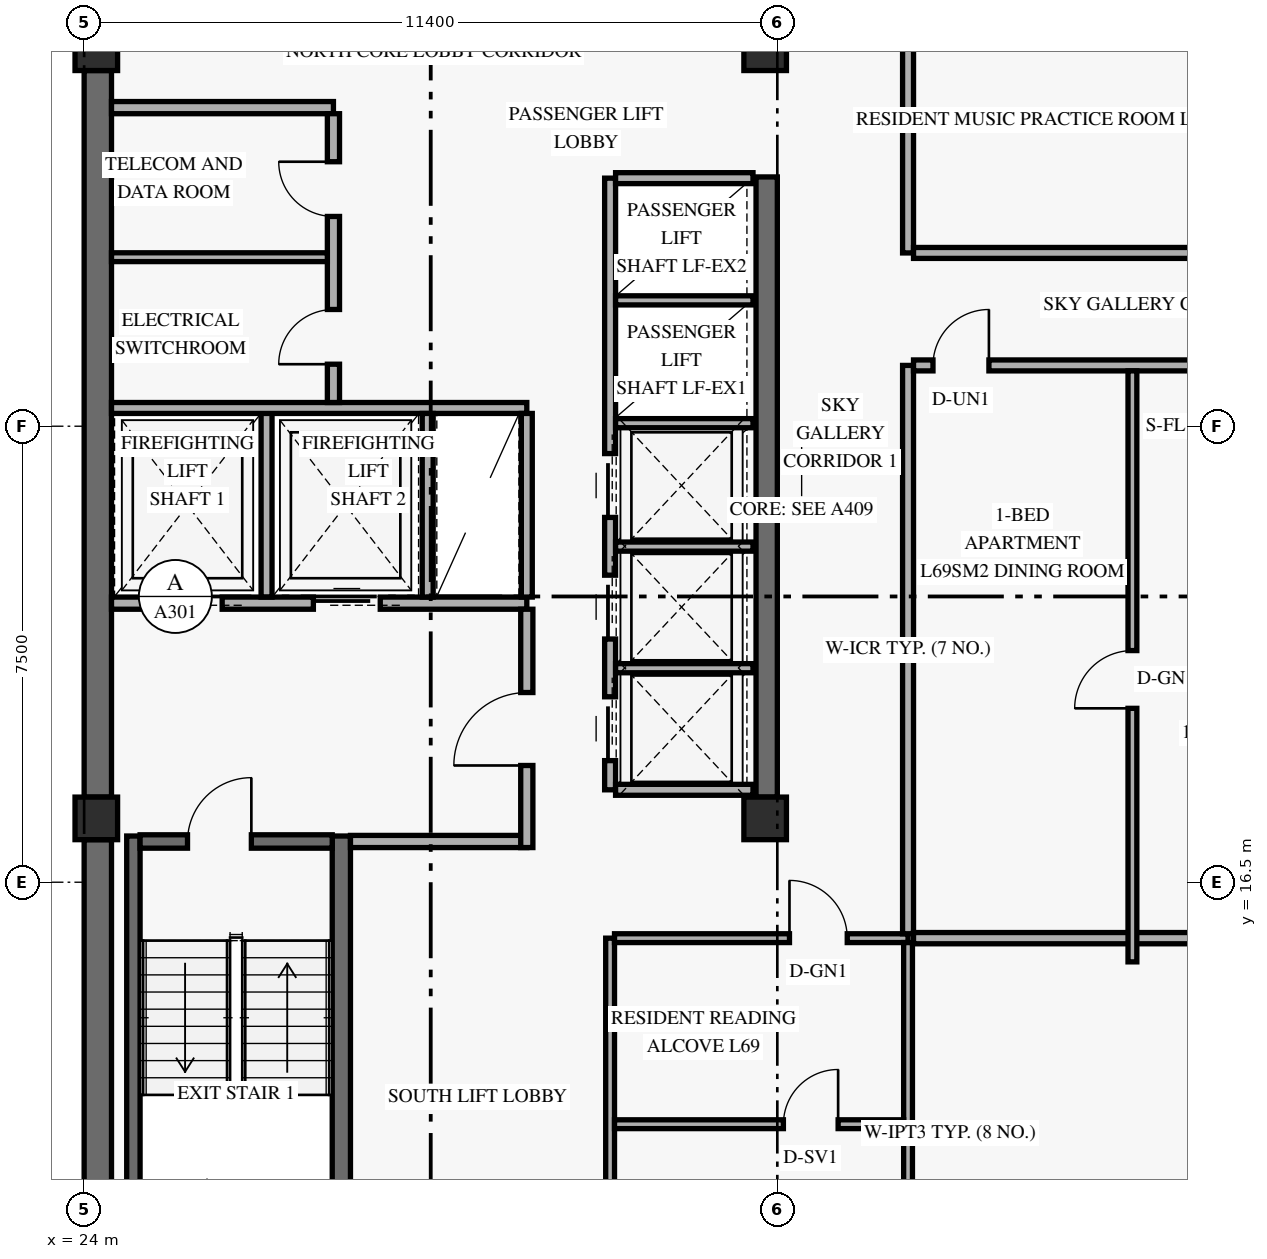
"""IFC4 building model, lengths in metres.
Left out: names, types, materials, properties, quantities, classifications, styles, units other than length and angle.
Written with IfcOpenShell. Run it as: python <this file> out.ifc"""

import sys

from ifc_helpers import new_model, si_unit, direction, frame, frame_2d, origin, origin_2d, place, context, subcontext, project, spatial, rectangle, extrude, element, fill, save


model = new_model("IFC4")
c1 = context("Model", 3, precision=1e-05, world=origin(), true_north=direction((0.0, 1.0)))
c2 = subcontext(c1, "Body", "Model", "MODEL_VIEW")
j1 = project(units=[si_unit("LENGTHUNIT", "METRE"), si_unit("PLANEANGLEUNIT", "RADIAN")], contexts=[c1])
p1 = place(None, origin())
s1 = spatial("IfcSite", under=j1, at=p1, CompositionType="ELEMENT")
p2 = place(p1, origin())
s2 = spatial("IfcBuilding", under=s1, at=p2, CompositionType="ELEMENT")
p3 = place(p2, frame((0.0, 0.0, 264.0)))
s3 = spatial("IfcBuildingStorey", under=s2, at=p3, CompositionType="ELEMENT", Elevation=264.0)
p4 = place(p3, frame((24.225, 9.6, 0.0), z_axis=(0.0, 0.0, 1.0), x_axis=(0.0, 1.0, 0.0)))
e1 = element("IfcWall", 1, at=p4, inside=s3, PredefinedType="SHEAR", context=c2, shape_type="SweptSolid", body=[
    extrude(rectangle(XDim=7.6, YDim=0.45, at=frame_2d((3.8, 0.0))), origin(), (0.0, 0.0, 1.0), 2.821),
])
p5 = place(p3, frame((24.225, 17.9, 0.0), z_axis=(0.0, 0.0, 1.0), x_axis=(0.0, 1.0, 0.0)))
e2 = element("IfcWall", 2, at=p5, inside=s3, PredefinedType="SHEAR", context=c2, shape_type="SweptSolid", body=[
    extrude(rectangle(XDim=11.95, YDim=0.45, at=frame_2d((5.975, 0.0))), origin(), (0.0, 0.0, 1.0), 2.821),
])
p6 = place(p3, frame((35.225, 17.9, 0.0), z_axis=(0.0, 0.0, 1.0), x_axis=(0.0, 1.0, 0.0)))
e3 = element("IfcWall", 3, at=p6, inside=s3, PredefinedType="SHEAR", context=c2, shape_type="SweptSolid", body=[
    extrude(rectangle(XDim=10.2, YDim=0.35, at=frame_2d((5.1, 0.0))), origin(), (0.0, 0.0, 1.0), 2.821),
])
p7 = place(p3, frame((24.81, 9.5, 0.0), z_axis=(0.0, 0.0, 1.0), x_axis=(0.0, 1.0, 0.0)))
e4 = element("IfcWall", 4, at=p7, inside=s3, PredefinedType="SHEAR", context=c2, shape_type="SweptSolid", body=[
    extrude(rectangle(XDim=7.76, YDim=0.22, at=frame_2d((3.88, 0.0))), origin(), (0.0, 0.0, 1.0), 3.36),
])
p8 = place(p3, frame((28.23, 9.5, 0.0), z_axis=(0.0, 0.0, 1.0), x_axis=(0.0, 1.0, 0.0)))
e5 = element("IfcWall", 5, at=p8, inside=s3, PredefinedType="SHEAR", context=c2, shape_type="SweptSolid", body=[
    extrude(rectangle(XDim=7.76, YDim=0.3, at=frame_2d((3.88, 0.0))), origin(), (0.0, 0.0, 1.0), 3.36),
])
p9 = place(p3, frame((24.92, 17.17, 0.0), z_axis=(0.0, 0.0, 1.0), x_axis=(1.0, 0.0, 0.0)))
e6 = element("IfcWall", 6, at=p9, inside=s3, PredefinedType="SHEAR", context=c2, shape_type="SweptSolid", body=[
    extrude(rectangle(XDim=3.16, YDim=0.22, at=frame_2d((1.58, 0.0))), origin(), (0.0, 0.0, 1.0), 3.36),
])
p10 = place(p9, frame((0.78, 0.0, 0.0)))
e7 = element("IfcOpeningElement", 7, at=p10, cuts=e6, PredefinedType="OPENING", context=c2, shape_type="SweptSolid", body=[
    extrude(rectangle(XDim=1.05, YDim=2.15, at=frame_2d((0.525, 1.075))), frame((0.0, 0.12, 0.0), z_axis=(0.0, -1.0, 0.0), x_axis=(1.0, 0.0, 0.0)), (0.0, 0.0, 1.0), 0.24),
])
for number, where, z_axis, x_axis in (
    (8, (24.2, 17.55, 0.0), (0.0, 0.0, 1.0), (1.0, 0.0, 0.0)),
    (9, (24.2, 30.2, 0.0), (0.0, 0.0, 1.0), (1.0, 0.0, 0.0)),
    (10, (35.2, 17.55, 0.0), (0.0, 0.0, 1.0), (1.0, 0.0, 0.0)),
    (11, (35.2, 30.2, 0.0), (0.0, 0.0, 1.0), (1.0, 0.0, 0.0)),
):
    element("IfcColumn", number, at=place(p3, frame(where, z_axis=z_axis, x_axis=x_axis)), inside=s3, PredefinedType="COLUMN", context=c2, shape_type="SweptSolid", body=[
        extrude(rectangle(XDim=0.7, YDim=0.7, at=origin_2d()), origin(), (0.0, 0.0, 1.0), 3.6),
    ])
p11 = place(p3, frame((24.45, 21.09, 0.0), z_axis=(0.0, 0.0, 1.0), x_axis=(1.0, 0.0, 0.0)))
e12 = element("IfcWall", 12, at=p11, inside=s3, PredefinedType="STANDARD", context=c2, shape_type="SweptSolid", body=[
    extrude(rectangle(XDim=6.83, YDim=0.2, at=frame_2d((3.415, 0.0))), origin(), (0.0, 0.0, 1.0), 3.36),
])
p12 = place(p11, frame((0.72, 0.0, 0.0)))
e13 = element("IfcOpeningElement", 13, at=p12, cuts=e12, PredefinedType="OPENING", context=c2, shape_type="SweptSolid", body=[
    extrude(rectangle(XDim=1.1, YDim=2.2, at=frame_2d((0.55, 1.1))), frame((0.0, 0.11, 0.0), z_axis=(0.0, -1.0, 0.0), x_axis=(1.0, 0.0, 0.0)), (0.0, 0.0, 1.0), 0.22),
])
p13 = place(p11, frame((3.32, 0.0, 0.0)))
e14 = element("IfcOpeningElement", 14, at=p13, cuts=e12, PredefinedType="OPENING", context=c2, shape_type="SweptSolid", body=[
    extrude(rectangle(XDim=1.1, YDim=2.2, at=frame_2d((0.55, 1.1))), frame((0.0, 0.11, 0.0), z_axis=(0.0, -1.0, 0.0), x_axis=(1.0, 0.0, 0.0)), (0.0, 0.0, 1.0), 0.22),
])
p14 = place(p3, frame((28.38, 17.17, 0.0), z_axis=(0.0, 0.0, 1.0), x_axis=(1.0, 0.0, 0.0)))
e15 = element("IfcWall", 15, at=p14, inside=s3, PredefinedType="STANDARD", context=c2, shape_type="SweptSolid", body=[
    extrude(rectangle(XDim=2.9, YDim=0.2, at=frame_2d((1.45, 0.0))), origin(), (0.0, 0.0, 1.0), 3.36),
])
p15 = place(p3, frame((31.28, 17.07, 0.0), z_axis=(0.0, 0.0, 1.0), x_axis=(0.0, 1.0, 0.0)))
e16 = element("IfcWall", 16, at=p15, inside=s3, PredefinedType="STANDARD", context=c2, shape_type="SweptSolid", body=[
    extrude(rectangle(XDim=3.92, YDim=0.2, at=frame_2d((1.96, 0.0))), origin(), (0.0, 0.0, 1.0), 2.803),
])
p16 = place(p15, frame((1.35, 0.0, 0.0)))
e17 = element("IfcOpeningElement", 17, at=p16, cuts=e16, PredefinedType="OPENING", context=c2, shape_type="SweptSolid", body=[
    extrude(rectangle(XDim=1.2, YDim=2.15, at=frame_2d((0.6, 1.075))), frame((0.0, 0.11, 0.0), z_axis=(0.0, -1.0, 0.0), x_axis=(1.0, 0.0, 0.0)), (0.0, 0.0, 1.0), 0.22),
])
p17 = place(p3, frame((27.0, 21.19, 0.0), z_axis=(0.0, 0.0, 1.0), x_axis=(0.0, 1.0, 0.0)))
e18 = element("IfcWall", 18, at=p17, inside=s3, PredefinedType="STANDARD", context=c2, shape_type="SweptSolid", body=[
    extrude(rectangle(XDim=3.11, YDim=0.18, at=frame_2d((1.555, 0.0))), origin(), (0.0, 0.0, 1.0), 3.36),
])
p18 = place(p3, frame((24.45, 24.3, 0.0), z_axis=(0.0, 0.0, 1.0), x_axis=(1.0, 0.0, 0.0)))
e19 = element("IfcWall", 19, at=p18, inside=s3, PredefinedType="STANDARD", context=c2, shape_type="SweptSolid", body=[
    extrude(rectangle(XDim=6.83, YDim=0.18, at=frame_2d((3.415, 0.0))), origin(), (0.0, 0.0, 1.0), 3.36),
])
for number, where, z_axis, x_axis in (
    (20, (29.65, 21.19, 0.0), (0.0, 0.0, 1.0), (0.0, 1.0, 0.0)),
    (21, (31.28, 21.19, 0.0), (0.0, 0.0, 1.0), (0.0, 1.0, 0.0)),
):
    element("IfcWall", number, at=place(p3, frame(where, z_axis=z_axis, x_axis=x_axis)), inside=s3, PredefinedType="STANDARD", context=c2, shape_type="SweptSolid", body=[
        extrude(rectangle(XDim=3.02, YDim=0.18, at=frame_2d((1.51, 0.0))), origin(), (0.0, 0.0, 1.0), 3.36),
    ])
p19 = place(p3, frame((24.45, 29.24, 0.0), z_axis=(0.0, 0.0, 1.0), x_axis=(1.0, 0.0, 0.0)))
e22 = element("IfcWall", 22, at=p19, inside=s3, PredefinedType="STANDARD", context=c2, shape_type="SweptSolid", body=[
    extrude(rectangle(XDim=3.65, YDim=0.2, at=frame_2d((1.825, 0.0))), origin(), (0.0, 0.0, 1.0), 3.36),
])
p20 = place(p3, frame((28.1, 24.39, 0.0), z_axis=(0.0, 0.0, 1.0), x_axis=(0.0, 1.0, 0.0)))
e23 = element("IfcWall", 23, at=p20, inside=s3, PredefinedType="STANDARD", context=c2, shape_type="SweptSolid", body=[
    extrude(rectangle(XDim=4.75, YDim=0.2, at=frame_2d((2.375, 0.0))), origin(), (0.0, 0.0, 1.0), 3.36),
])
p21 = place(p20, frame((0.63, 0.0, 0.0)))
e24 = element("IfcOpeningElement", 24, at=p21, cuts=e23, PredefinedType="OPENING", context=c2, shape_type="SweptSolid", body=[
    extrude(rectangle(XDim=0.9, YDim=2.1, at=frame_2d((0.45, 1.05))), frame((0.0, 0.11, 0.0), z_axis=(0.0, -1.0, 0.0), x_axis=(1.0, 0.0, 0.0)), (0.0, 0.0, 1.0), 0.22),
])
p22 = place(p20, frame((3.06, 0.0, 0.0)))
e25 = element("IfcOpeningElement", 25, at=p22, cuts=e23, PredefinedType="OPENING", context=c2, shape_type="SweptSolid", body=[
    extrude(rectangle(XDim=0.9, YDim=2.1, at=frame_2d((0.45, 1.05))), frame((0.0, 0.11, 0.0), z_axis=(0.0, -1.0, 0.0), x_axis=(1.0, 0.0, 0.0)), (0.0, 0.0, 1.0), 0.22),
])
p23 = place(p3, frame((24.45, 26.78, 0.0), z_axis=(0.0, 0.0, 1.0), x_axis=(1.0, 0.0, 0.0)))
e26 = element("IfcWall", 26, at=p23, inside=s3, PredefinedType="PARTITIONING", context=c2, shape_type="SweptSolid", body=[
    extrude(rectangle(XDim=3.55, YDim=0.145, at=frame_2d((1.775, 0.0))), origin(), (0.0, 0.0, 1.0), 3.36),
])
p24 = place(p3, frame((32.65, 18.02, 0.0), z_axis=(0.0, 0.0, 1.0), x_axis=(0.0, 1.0, 0.0)))
e27 = element("IfcWall", 27, at=p24, inside=s3, PredefinedType="STANDARD", context=c2, shape_type="SweptSolid", body=[
    extrude(rectangle(XDim=10.06, YDim=0.18, at=frame_2d((5.03, 0.0))), origin(), (0.0, 0.0, 1.0), 3.36),
])
p25 = place(p24, frame((0.48, 0.0, 0.0)))
e28 = element("IfcOpeningElement", 28, at=p25, cuts=e27, PredefinedType="OPENING", context=c2, shape_type="SweptSolid", body=[
    extrude(rectangle(XDim=1.05, YDim=2.2, at=frame_2d((0.525, 1.1))), frame((0.0, 0.1, 0.0), z_axis=(0.0, -1.0, 0.0), x_axis=(1.0, 0.0, 0.0)), (0.0, 0.0, 1.0), 0.2),
])
p26 = place(p24, frame((2.48, 0.0, 0.0)))
e29 = element("IfcOpeningElement", 29, at=p26, cuts=e27, PredefinedType="OPENING", context=c2, shape_type="SweptSolid", body=[
    extrude(rectangle(XDim=1.05, YDim=2.2, at=frame_2d((0.525, 1.1))), frame((0.0, 0.1, 0.0), z_axis=(0.0, -1.0, 0.0), x_axis=(1.0, 0.0, 0.0)), (0.0, 0.0, 1.0), 0.2),
])
p27 = place(p24, frame((4.48, 0.0, 0.0)))
e30 = element("IfcOpeningElement", 30, at=p27, cuts=e27, PredefinedType="OPENING", context=c2, shape_type="SweptSolid", body=[
    extrude(rectangle(XDim=1.05, YDim=2.2, at=frame_2d((0.525, 1.1))), frame((0.0, 0.1, 0.0), z_axis=(0.0, -1.0, 0.0), x_axis=(1.0, 0.0, 0.0)), (0.0, 0.0, 1.0), 0.2),
])
for number, where, z_axis, x_axis in (
    (31, (32.74, 18.02, 0.0), (0.0, 0.0, 1.0), (1.0, 0.0, 0.0)),
    (32, (32.74, 28.08, 0.0), (0.0, 0.0, 1.0), (1.0, 0.0, 0.0)),
):
    element("IfcWall", number, at=place(p3, frame(where, z_axis=z_axis, x_axis=x_axis)), inside=s3, PredefinedType="STANDARD", context=c2, shape_type="SweptSolid", body=[
        extrude(rectangle(XDim=2.26, YDim=0.18, at=frame_2d((1.13, 0.0))), origin(), (0.0, 0.0, 1.0), 3.36),
    ])
for number, where, z_axis, x_axis in (
    (33, (32.74, 20.02, 0.0), (0.0, 0.0, 1.0), (1.0, 0.0, 0.0)),
    (34, (32.74, 22.02, 0.0), (0.0, 0.0, 1.0), (1.0, 0.0, 0.0)),
    (35, (32.74, 24.05, 0.0), (0.0, 0.0, 1.0), (1.0, 0.0, 0.0)),
    (36, (32.74, 26.07, 0.0), (0.0, 0.0, 1.0), (1.0, 0.0, 0.0)),
):
    element("IfcWall", number, at=place(p3, frame(where, z_axis=z_axis, x_axis=x_axis)), inside=s3, PredefinedType="STANDARD", context=c2, shape_type="SweptSolid", body=[
        extrude(rectangle(XDim=2.26, YDim=0.15, at=frame_2d((1.13, 0.0))), origin(), (0.0, 0.0, 1.0), 3.36),
    ])
p28 = place(p3, frame((32.65, 9.5, 0.0), z_axis=(0.0, 0.0, 1.0), x_axis=(0.0, 1.0, 0.0)))
e37 = element("IfcWall", 37, at=p28, inside=s3, PredefinedType="PARTITIONING", context=c2, shape_type="SweptSolid", body=[
    extrude(rectangle(XDim=6.08, YDim=0.145, at=frame_2d((3.04, 0.0))), origin(), (0.0, 0.0, 1.0), 3.36),
])
p29 = place(p3, frame((32.722, 15.58, 0.0), z_axis=(0.0, 0.0, 1.0), x_axis=(1.0, 0.0, 0.0)))
e38 = element("IfcWall", 38, at=p29, inside=s3, PredefinedType="PARTITIONING", context=c2, shape_type="SweptSolid", body=[
    extrude(rectangle(XDim=4.828, YDim=0.145, at=frame_2d((2.414, 0.0))), origin(), (0.0, 0.0, 1.0), 2.803),
])
p30 = place(p29, frame((2.877, 0.0, 0.0)))
e39 = element("IfcOpeningElement", 39, at=p30, cuts=e38, PredefinedType="OPENING", context=c2, shape_type="SweptSolid", body=[
    extrude(rectangle(XDim=0.95, YDim=2.15, at=frame_2d((0.475, 1.075))), frame((0.0, 0.083, 0.0), z_axis=(0.0, -1.0, 0.0), x_axis=(1.0, 0.0, 0.0)), (0.0, 0.0, 1.0), 0.165),
])
p31 = place(p3, frame((37.55, 9.25, 0.0), z_axis=(0.0, 0.0, 1.0), x_axis=(0.0, 1.0, 0.0)))
e40 = element("IfcWall", 40, at=p31, inside=s3, PredefinedType="PARTITIONING", context=c2, shape_type="SweptSolid", body=[
    extrude(rectangle(XDim=6.258, YDim=0.145, at=frame_2d((3.129, 0.0))), origin(), (0.0, 0.0, 1.0), 2.803),
])
p32 = place(p3, frame((32.722, 12.52, 0.0), z_axis=(0.0, 0.0, 1.0), x_axis=(1.0, 0.0, 0.0)))
e41 = element("IfcWall", 41, at=p32, inside=s3, PredefinedType="PARTITIONING", context=c2, shape_type="SweptSolid", body=[
    extrude(rectangle(XDim=4.755, YDim=0.145, at=frame_2d((2.377, 0.0))), origin(), (0.0, 0.0, 1.0), 2.803),
])
p33 = place(p32, frame((2.778, 0.0, 0.0)))
e42 = element("IfcOpeningElement", 42, at=p33, cuts=e41, PredefinedType="OPENING", context=c2, shape_type="SweptSolid", body=[
    extrude(rectangle(XDim=0.9, YDim=2.1, at=frame_2d((0.45, 1.05))), frame((0.0, 0.083, 0.0), z_axis=(0.0, -1.0, 0.0), x_axis=(1.0, 0.0, 0.0)), (0.0, 0.0, 1.0), 0.165),
])
p34 = place(p3, frame((37.55, 15.653, 0.0), z_axis=(0.0, 0.0, 1.0), x_axis=(0.0, 1.0, 0.0)))
e43 = element("IfcWall", 43, at=p34, inside=s3, PredefinedType="STANDARD", context=c2, shape_type="SweptSolid", body=[
    extrude(rectangle(XDim=9.347, YDim=0.18, at=frame_2d((4.674, 0.0))), origin(), (0.0, 0.0, 1.0), 2.803),
])
p35 = place(p3, frame((37.55, 26.85, 0.0), z_axis=(0.0, 0.0, 1.0), x_axis=(0.0, 1.0, 0.0)))
e44 = element("IfcWall", 44, at=p35, inside=s3, PredefinedType="STANDARD", context=c2, shape_type="SweptSolid", body=[
    extrude(rectangle(XDim=4.427, YDim=0.18, at=frame_2d((2.214, 0.0))), origin(), (0.0, 0.0, 1.0), 2.803),
])
p36 = place(p3, frame((37.64, 25.0, 0.0), z_axis=(0.0, 0.0, 1.0), x_axis=(1.0, 0.0, 0.0)))
e45 = element("IfcWall", 45, at=p36, inside=s3, PredefinedType="STANDARD", context=c2, shape_type="SweptSolid", body=[
    extrude(rectangle(XDim=16.87, YDim=0.18, at=frame_2d((8.435, 0.0))), origin(), (0.0, 0.0, 1.0), 2.803),
])
p37 = place(p36, frame((0.32, 0.0, 0.0)))
e46 = element("IfcOpeningElement", 46, at=p37, cuts=e45, PredefinedType="OPENING", context=c2, shape_type="SweptSolid", body=[
    extrude(rectangle(XDim=0.92, YDim=2.15, at=frame_2d((0.46, 1.075))), frame((0.0, 0.1, 0.0), z_axis=(0.0, -1.0, 0.0), x_axis=(1.0, 0.0, 0.0)), (0.0, 0.0, 1.0), 0.2),
])
p38 = place(p3, frame((37.64, 26.85, 0.0), z_axis=(0.0, 0.0, 1.0), x_axis=(1.0, 0.0, 0.0)))
e47 = element("IfcWall", 47, at=p38, inside=s3, PredefinedType="STANDARD", context=c2, shape_type="SweptSolid", body=[
    extrude(rectangle(XDim=16.87, YDim=0.18, at=frame_2d((8.435, 0.0))), origin(), (0.0, 0.0, 1.0), 2.803),
])
p39 = place(p38, frame((7.975, 0.0, 0.0)))
e48 = element("IfcOpeningElement", 48, at=p39, cuts=e47, PredefinedType="OPENING", context=c2, shape_type="SweptSolid", body=[
    extrude(rectangle(XDim=0.92, YDim=2.15, at=frame_2d((0.46, 1.075))), frame((0.0, 0.1, 0.0), z_axis=(0.0, -1.0, 0.0), x_axis=(1.0, 0.0, 0.0)), (0.0, 0.0, 1.0), 0.2),
])
p40 = place(p3, frame((37.64, 15.58, 0.0), z_axis=(0.0, 0.0, 1.0), x_axis=(1.0, 0.0, 0.0)))
e49 = element("IfcWall", 49, at=p40, inside=s3, PredefinedType="PARTITIONING", context=c2, shape_type="SweptSolid", body=[
    extrude(rectangle(XDim=16.87, YDim=0.185, at=frame_2d((8.435, 0.0))), origin(), (0.0, 0.0, 1.0), 2.803),
])
p41 = place(p3, frame((41.24, 15.19, 0.0), z_axis=(0.0, 0.0, 1.0), x_axis=(0.0, 1.0, 0.0)))
e50 = element("IfcWall", 50, at=p41, inside=s3, PredefinedType="PARTITIONING", context=c2, shape_type="SweptSolid", body=[
    extrude(rectangle(XDim=9.72, YDim=0.145, at=frame_2d((4.86, 0.0))), origin(), (0.0, 0.0, 1.0), 2.803),
])
p42 = place(p41, frame((4.17, 0.0, 0.0)))
e51 = element("IfcOpeningElement", 51, at=p42, cuts=e50, PredefinedType="OPENING", context=c2, shape_type="SweptSolid", body=[
    extrude(rectangle(XDim=0.95, YDim=2.15, at=frame_2d((0.475, 1.075))), frame((0.0, 0.083, 0.0), z_axis=(0.0, -1.0, 0.0), x_axis=(1.0, 0.0, 0.0)), (0.0, 0.0, 1.0), 0.165),
])
p43 = place(p10, frame((1.05, 0.0, 0.0), z_axis=(0.0, 0.0, 1.0), x_axis=(-1.0, 0.0, 0.0)))
e52 = element("IfcDoor", 52, at=p43, inside=s3, OperationType="SINGLE_SWING_LEFT", PredefinedType="DOOR", context=c2, shape_type="SweptSolid", body=[
    extrude(rectangle(XDim=1.05, YDim=2.15, at=frame_2d((0.525, 1.075))), frame((0.0, 0.025, 0.0), z_axis=(0.0, -1.0, 0.0), x_axis=(1.0, 0.0, 0.0)), (0.0, 0.0, 1.0), 0.05),
])
fill(e7, e52)
p44 = place(p12, origin())
e53 = element("IfcDoor", 53, at=p44, inside=s3, OperationType="SLIDING_TO_LEFT", PredefinedType="DOOR", context=c2, shape_type="SweptSolid", body=[
    extrude(rectangle(XDim=1.1, YDim=2.2, at=frame_2d((0.55, 1.1))), frame((0.0, 0.025, 0.0), z_axis=(0.0, -1.0, 0.0), x_axis=(1.0, 0.0, 0.0)), (0.0, 0.0, 1.0), 0.05),
])
fill(e13, e53)
p45 = place(p13, origin())
e54 = element("IfcDoor", 54, at=p45, inside=s3, OperationType="SLIDING_TO_LEFT", PredefinedType="DOOR", context=c2, shape_type="SweptSolid", body=[
    extrude(rectangle(XDim=1.1, YDim=2.2, at=frame_2d((0.55, 1.1))), frame((0.0, 0.025, 0.0), z_axis=(0.0, -1.0, 0.0), x_axis=(1.0, 0.0, 0.0)), (0.0, 0.0, 1.0), 0.05),
])
fill(e14, e54)
p46 = place(p16, origin())
e55 = element("IfcDoor", 55, at=p46, inside=s3, OperationType="SINGLE_SWING_LEFT", PredefinedType="DOOR", context=c2, shape_type="SweptSolid", body=[
    extrude(rectangle(XDim=1.2, YDim=2.15, at=frame_2d((0.6, 1.075))), frame((0.0, 0.025, 0.0), z_axis=(0.0, -1.0, 0.0), x_axis=(1.0, 0.0, 0.0)), (0.0, 0.0, 1.0), 0.05),
])
fill(e17, e55)
p47 = place(p21, origin())
e56 = element("IfcDoor", 56, at=p47, inside=s3, OperationType="SINGLE_SWING_LEFT", PredefinedType="DOOR", context=c2, shape_type="SweptSolid", body=[
    extrude(rectangle(XDim=0.9, YDim=2.1, at=frame_2d((0.45, 1.05))), frame((0.0, 0.025, 0.0), z_axis=(0.0, -1.0, 0.0), x_axis=(1.0, 0.0, 0.0)), (0.0, 0.0, 1.0), 0.05),
])
fill(e24, e56)
p48 = place(p22, origin())
e57 = element("IfcDoor", 57, at=p48, inside=s3, OperationType="SINGLE_SWING_RIGHT", PredefinedType="DOOR", context=c2, shape_type="SweptSolid", body=[
    extrude(rectangle(XDim=0.9, YDim=2.1, at=frame_2d((0.45, 1.05))), frame((0.0, 0.025, 0.0), z_axis=(0.0, -1.0, 0.0), x_axis=(1.0, 0.0, 0.0)), (0.0, 0.0, 1.0), 0.05),
])
fill(e25, e57)
p49 = place(p25, origin())
e58 = element("IfcDoor", 58, at=p49, inside=s3, OperationType="SLIDING_TO_LEFT", PredefinedType="DOOR", context=c2, shape_type="SweptSolid", body=[
    extrude(rectangle(XDim=1.05, YDim=2.2, at=frame_2d((0.525, 1.1))), frame((0.0, 0.025, 0.0), z_axis=(0.0, -1.0, 0.0), x_axis=(1.0, 0.0, 0.0)), (0.0, 0.0, 1.0), 0.05),
])
fill(e28, e58)
p50 = place(p26, origin())
e59 = element("IfcDoor", 59, at=p50, inside=s3, OperationType="SLIDING_TO_LEFT", PredefinedType="DOOR", context=c2, shape_type="SweptSolid", body=[
    extrude(rectangle(XDim=1.05, YDim=2.2, at=frame_2d((0.525, 1.1))), frame((0.0, 0.025, 0.0), z_axis=(0.0, -1.0, 0.0), x_axis=(1.0, 0.0, 0.0)), (0.0, 0.0, 1.0), 0.05),
])
fill(e29, e59)
p51 = place(p27, origin())
e60 = element("IfcDoor", 60, at=p51, inside=s3, OperationType="SLIDING_TO_LEFT", PredefinedType="DOOR", context=c2, shape_type="SweptSolid", body=[
    extrude(rectangle(XDim=1.05, YDim=2.2, at=frame_2d((0.525, 1.1))), frame((0.0, 0.025, 0.0), z_axis=(0.0, -1.0, 0.0), x_axis=(1.0, 0.0, 0.0)), (0.0, 0.0, 1.0), 0.05),
])
fill(e30, e60)
p52 = place(p30, origin())
e61 = element("IfcDoor", 61, at=p52, inside=s3, OperationType="SINGLE_SWING_LEFT", PredefinedType="DOOR", context=c2, shape_type="SweptSolid", body=[
    extrude(rectangle(XDim=0.95, YDim=2.15, at=frame_2d((0.475, 1.075))), frame((0.0, 0.025, 0.0), z_axis=(0.0, -1.0, 0.0), x_axis=(1.0, 0.0, 0.0)), (0.0, 0.0, 1.0), 0.05),
])
fill(e39, e61)
p53 = place(p33, origin())
e62 = element("IfcDoor", 62, at=p53, inside=s3, OperationType="SINGLE_SWING_RIGHT", PredefinedType="DOOR", context=c2, shape_type="SweptSolid", body=[
    extrude(rectangle(XDim=0.9, YDim=2.1, at=frame_2d((0.45, 1.05))), frame((0.0, 0.025, 0.0), z_axis=(0.0, -1.0, 0.0), x_axis=(1.0, 0.0, 0.0)), (0.0, 0.0, 1.0), 0.05),
])
fill(e42, e62)
p54 = place(p42, origin())
e63 = element("IfcDoor", 63, at=p54, inside=s3, OperationType="SINGLE_SWING_LEFT", PredefinedType="DOOR", context=c2, shape_type="SweptSolid", body=[
    extrude(rectangle(XDim=0.95, YDim=2.15, at=frame_2d((0.475, 1.075))), frame((0.0, 0.025, 0.0), z_axis=(0.0, -1.0, 0.0), x_axis=(1.0, 0.0, 0.0)), (0.0, 0.0, 1.0), 0.05),
])
fill(e51, e63)
p55 = place(p37, origin())
e64 = element("IfcDoor", 64, at=p55, inside=s3, OperationType="SINGLE_SWING_RIGHT", PredefinedType="DOOR", context=c2, shape_type="SweptSolid", body=[
    extrude(rectangle(XDim=0.92, YDim=2.15, at=frame_2d((0.46, 1.075))), frame((0.0, 0.025, 0.0), z_axis=(0.0, -1.0, 0.0), x_axis=(1.0, 0.0, 0.0)), (0.0, 0.0, 1.0), 0.05),
])
fill(e46, e64)
save(model, sys.argv[1])
